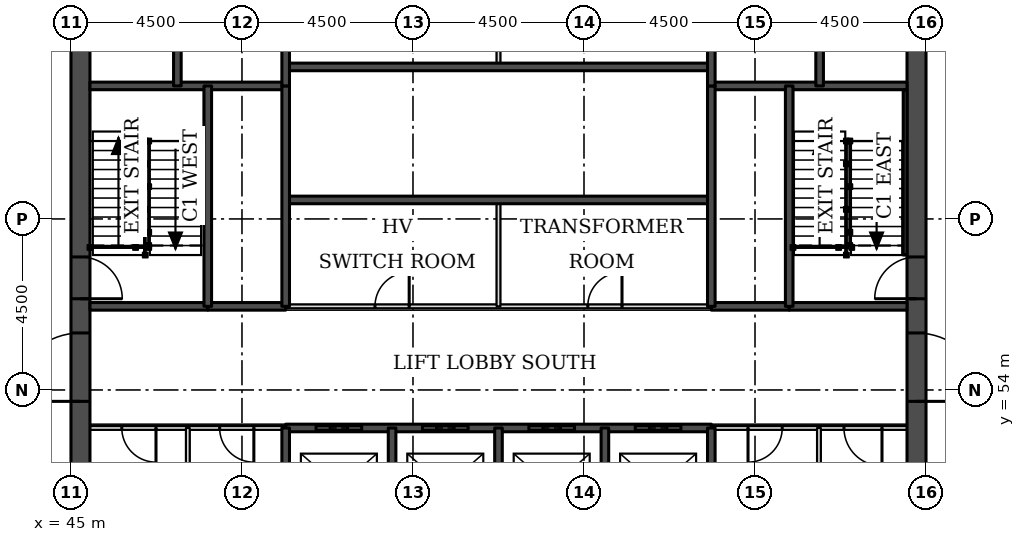
"""IFC4 building model, lengths in metres.
Left out: names, types, materials, properties, quantities, classifications, styles, units other than length and angle.
Written with IfcOpenShell. Run it as: python <this file> out.ifc"""

import sys

from ifc_helpers import new_model, si_unit, direction, frame, frame_2d, origin, place, context, subcontext, project, spatial, rectangle, extrude, element, fill, save


model = new_model("IFC4")
c1 = context("Model", 3, precision=1e-05, world=origin(), true_north=direction((0.0, 1.0)))
c2 = subcontext(c1, "Body", "Model", "MODEL_VIEW")
j1 = project(units=[si_unit("LENGTHUNIT", "METRE"), si_unit("PLANEANGLEUNIT", "RADIAN")], contexts=[c1])
p1 = place(None, origin())
s1 = spatial("IfcSite", under=j1, at=p1, CompositionType="ELEMENT")
p2 = place(p1, origin())
s2 = spatial("IfcBuilding", under=s1, at=p2, CompositionType="ELEMENT")
p3 = place(p2, frame((0.0, 0.0, -4.5)))
s3 = spatial("IfcBuildingStorey", under=s2, at=p3, CompositionType="ELEMENT", Elevation=-4.5)
p4 = place(p3, frame((45.25, 49.5, 0.0), z_axis=(0.0, 0.0, 1.0), x_axis=(0.0, 1.0, 0.0)))
e1 = element("IfcWall", 1, at=p4, inside=s3, PredefinedType="SHEAR", context=c2, shape_type="SweptSolid", body=[
    extrude(rectangle(XDim=22.5, YDim=0.5, at=frame_2d((11.25, 0.0))), origin(), (0.0, 0.0, 1.0), 4.5),
])
p5 = place(p4, frame((4.2, 0.0, 0.0)))
e2 = element("IfcOpeningElement", 2, at=p5, cuts=e1, PredefinedType="OPENING", context=c2, shape_type="SweptSolid", body=[
    extrude(rectangle(XDim=1.8, YDim=2.1, at=frame_2d((0.9, 1.05))), frame((0.0, 0.26, 0.0), z_axis=(0.0, -1.0, 0.0), x_axis=(1.0, 0.0, 0.0)), (0.0, 0.0, 1.0), 0.52),
])
p6 = place(p4, frame((6.9, 0.0, 0.0)))
e3 = element("IfcOpeningElement", 3, at=p6, cuts=e1, PredefinedType="OPENING", context=c2, shape_type="SweptSolid", body=[
    extrude(rectangle(XDim=1.1, YDim=2.1, at=frame_2d((0.55, 1.05))), frame((0.0, 0.26, 0.0), z_axis=(0.0, -1.0, 0.0), x_axis=(1.0, 0.0, 0.0)), (0.0, 0.0, 1.0), 0.52),
])
p7 = place(p4, frame((13.6, 0.0, 0.0)))
e4 = element("IfcOpeningElement", 4, at=p7, cuts=e1, PredefinedType="OPENING", context=c2, shape_type="SweptSolid", body=[
    extrude(rectangle(XDim=1.1, YDim=2.1, at=frame_2d((0.55, 1.05))), frame((0.0, 0.26, 0.0), z_axis=(0.0, -1.0, 0.0), x_axis=(1.0, 0.0, 0.0)), (0.0, 0.0, 1.0), 0.52),
])
p8 = place(p4, frame((16.5, 0.0, 0.0)))
e5 = element("IfcOpeningElement", 5, at=p8, cuts=e1, PredefinedType="OPENING", context=c2, shape_type="SweptSolid", body=[
    extrude(rectangle(XDim=1.8, YDim=2.1, at=frame_2d((0.9, 1.05))), frame((0.0, 0.26, 0.0), z_axis=(0.0, -1.0, 0.0), x_axis=(1.0, 0.0, 0.0)), (0.0, 0.0, 1.0), 0.52),
])
p9 = place(p3, frame((67.25, 49.5, 0.0), z_axis=(0.0, 0.0, 1.0), x_axis=(0.0, 1.0, 0.0)))
e6 = element("IfcWall", 6, at=p9, inside=s3, PredefinedType="SHEAR", context=c2, shape_type="SweptSolid", body=[
    extrude(rectangle(XDim=22.5, YDim=0.5, at=frame_2d((11.25, 0.0))), origin(), (0.0, 0.0, 1.0), 4.5),
])
p10 = place(p9, frame((4.2, 0.0, 0.0)))
e7 = element("IfcOpeningElement", 7, at=p10, cuts=e6, PredefinedType="OPENING", context=c2, shape_type="SweptSolid", body=[
    extrude(rectangle(XDim=1.8, YDim=2.1, at=frame_2d((0.9, 1.05))), frame((0.0, 0.26, 0.0), z_axis=(0.0, -1.0, 0.0), x_axis=(1.0, 0.0, 0.0)), (0.0, 0.0, 1.0), 0.52),
])
p11 = place(p9, frame((6.9, 0.0, 0.0)))
e8 = element("IfcOpeningElement", 8, at=p11, cuts=e6, PredefinedType="OPENING", context=c2, shape_type="SweptSolid", body=[
    extrude(rectangle(XDim=1.1, YDim=2.1, at=frame_2d((0.55, 1.05))), frame((0.0, 0.26, 0.0), z_axis=(0.0, -1.0, 0.0), x_axis=(1.0, 0.0, 0.0)), (0.0, 0.0, 1.0), 0.52),
])
p12 = place(p9, frame((13.6, 0.0, 0.0)))
e9 = element("IfcOpeningElement", 9, at=p12, cuts=e6, PredefinedType="OPENING", context=c2, shape_type="SweptSolid", body=[
    extrude(rectangle(XDim=1.1, YDim=2.1, at=frame_2d((0.55, 1.05))), frame((0.0, 0.26, 0.0), z_axis=(0.0, -1.0, 0.0), x_axis=(1.0, 0.0, 0.0)), (0.0, 0.0, 1.0), 0.52),
])
p13 = place(p9, frame((16.5, 0.0, 0.0)))
e10 = element("IfcOpeningElement", 10, at=p13, cuts=e6, PredefinedType="OPENING", context=c2, shape_type="SweptSolid", body=[
    extrude(rectangle(XDim=1.8, YDim=2.1, at=frame_2d((0.9, 1.05))), frame((0.0, 0.26, 0.0), z_axis=(0.0, -1.0, 0.0), x_axis=(1.0, 0.0, 0.0)), (0.0, 0.0, 1.0), 0.52),
])
p14 = place(p3, frame((45.5, 53.0, 0.0), z_axis=(0.0, 0.0, 1.0), x_axis=(1.0, 0.0, 0.0)))
e11 = element("IfcWall", 11, at=p14, inside=s3, PredefinedType="PARTITIONING", context=c2, shape_type="SweptSolid", body=[
    extrude(rectangle(XDim=5.15, YDim=0.1, at=frame_2d((2.575, 0.0))), origin(), (0.0, 0.0, 1.0), 4.1),
])
p15 = place(p14, frame((0.837, 0.0, 0.0)))
e12 = element("IfcOpeningElement", 12, at=p15, cuts=e11, PredefinedType="OPENING", context=c2, shape_type="SweptSolid", body=[
    extrude(rectangle(XDim=0.9, YDim=2.1, at=frame_2d((0.45, 1.05))), frame((0.0, 0.06, 0.0), z_axis=(0.0, -1.0, 0.0), x_axis=(1.0, 0.0, 0.0)), (0.0, 0.0, 1.0), 0.12),
])
p16 = place(p14, frame((3.413, 0.0, 0.0)))
e13 = element("IfcOpeningElement", 13, at=p16, cuts=e11, PredefinedType="OPENING", context=c2, shape_type="SweptSolid", body=[
    extrude(rectangle(XDim=0.9, YDim=2.1, at=frame_2d((0.45, 1.05))), frame((0.0, 0.06, 0.0), z_axis=(0.0, -1.0, 0.0), x_axis=(1.0, 0.0, 0.0)), (0.0, 0.0, 1.0), 0.12),
])
p17 = place(p3, frame((61.85, 53.0, 0.0), z_axis=(0.0, 0.0, 1.0), x_axis=(1.0, 0.0, 0.0)))
e14 = element("IfcWall", 14, at=p17, inside=s3, PredefinedType="PARTITIONING", context=c2, shape_type="SweptSolid", body=[
    extrude(rectangle(XDim=5.15, YDim=0.1, at=frame_2d((2.575, 0.0))), origin(), (0.0, 0.0, 1.0), 4.1),
])
p18 = place(p17, frame((3.491, 0.0, 0.0)))
e15 = element("IfcOpeningElement", 15, at=p18, cuts=e14, PredefinedType="OPENING", context=c2, shape_type="SweptSolid", body=[
    extrude(rectangle(XDim=1.0, YDim=2.1, at=frame_2d((0.5, 1.05))), frame((0.0, 0.06, 0.0), z_axis=(0.0, -1.0, 0.0), x_axis=(1.0, 0.0, 0.0)), (0.0, 0.0, 1.0), 0.12),
])
p19 = place(p17, frame((0.966, 0.0, 0.0)))
e16 = element("IfcOpeningElement", 16, at=p19, cuts=e14, PredefinedType="OPENING", context=c2, shape_type="SweptSolid", body=[
    extrude(rectangle(XDim=0.9, YDim=2.1, at=frame_2d((0.45, 1.05))), frame((0.0, 0.06, 0.0), z_axis=(0.0, -1.0, 0.0), x_axis=(1.0, 0.0, 0.0)), (0.0, 0.0, 1.0), 0.12),
])
p20 = place(p3, frame((50.65, 53.0, 0.0), z_axis=(0.0, 0.0, 1.0), x_axis=(1.0, 0.0, 0.0)))
e17 = element("IfcWall", 17, at=p20, inside=s3, PredefinedType="SOLIDWALL", context=c2, shape_type="SweptSolid", body=[
    extrude(rectangle(XDim=11.2, YDim=0.2, at=frame_2d((5.6, 0.0))), origin(), (0.0, 0.0, 1.0), 4.1),
])
p21 = place(p20, frame((0.8, 0.0, 0.0)))
e18 = element("IfcOpeningElement", 18, at=p21, cuts=e17, PredefinedType="OPENING", context=c2, shape_type="SweptSolid", body=[
    extrude(rectangle(XDim=1.2, YDim=2.1, at=frame_2d((0.6, 1.05))), frame((0.0, 0.11, 0.0), z_axis=(0.0, -1.0, 0.0), x_axis=(1.0, 0.0, 0.0)), (0.0, 0.0, 1.0), 0.22),
])
p22 = place(p20, frame((3.6, 0.0, 0.0)))
e19 = element("IfcOpeningElement", 19, at=p22, cuts=e17, PredefinedType="OPENING", context=c2, shape_type="SweptSolid", body=[
    extrude(rectangle(XDim=1.2, YDim=2.1, at=frame_2d((0.6, 1.05))), frame((0.0, 0.11, 0.0), z_axis=(0.0, -1.0, 0.0), x_axis=(1.0, 0.0, 0.0)), (0.0, 0.0, 1.0), 0.22),
])
p23 = place(p20, frame((6.4, 0.0, 0.0)))
e20 = element("IfcOpeningElement", 20, at=p23, cuts=e17, PredefinedType="OPENING", context=c2, shape_type="SweptSolid", body=[
    extrude(rectangle(XDim=1.2, YDim=2.1, at=frame_2d((0.6, 1.05))), frame((0.0, 0.11, 0.0), z_axis=(0.0, -1.0, 0.0), x_axis=(1.0, 0.0, 0.0)), (0.0, 0.0, 1.0), 0.22),
])
p24 = place(p20, frame((9.2, 0.0, 0.0)))
e21 = element("IfcOpeningElement", 21, at=p24, cuts=e17, PredefinedType="OPENING", context=c2, shape_type="SweptSolid", body=[
    extrude(rectangle(XDim=1.2, YDim=2.1, at=frame_2d((0.6, 1.05))), frame((0.0, 0.11, 0.0), z_axis=(0.0, -1.0, 0.0), x_axis=(1.0, 0.0, 0.0)), (0.0, 0.0, 1.0), 0.22),
])
p25 = place(p3, frame((50.65, 56.2, 0.0), z_axis=(0.0, 0.0, 1.0), x_axis=(1.0, 0.0, 0.0)))
e22 = element("IfcWall", 22, at=p25, inside=s3, PredefinedType="PARTITIONING", context=c2, shape_type="SweptSolid", body=[
    extrude(rectangle(XDim=11.2, YDim=0.1, at=frame_2d((5.6, 0.0))), origin(), (0.0, 0.0, 1.0), 4.1),
])
p26 = place(p25, frame((2.35, 0.0, 0.0)))
e23 = element("IfcOpeningElement", 23, at=p26, cuts=e22, PredefinedType="OPENING", context=c2, shape_type="SweptSolid", body=[
    extrude(rectangle(XDim=0.9, YDim=2.1, at=frame_2d((0.45, 1.05))), frame((0.0, 0.06, 0.0), z_axis=(0.0, -1.0, 0.0), x_axis=(1.0, 0.0, 0.0)), (0.0, 0.0, 1.0), 0.12),
])
p27 = place(p25, frame((7.95, 0.0, 0.0)))
e24 = element("IfcOpeningElement", 24, at=p27, cuts=e22, PredefinedType="OPENING", context=c2, shape_type="SweptSolid", body=[
    extrude(rectangle(XDim=0.9, YDim=2.1, at=frame_2d((0.45, 1.05))), frame((0.0, 0.06, 0.0), z_axis=(0.0, -1.0, 0.0), x_axis=(1.0, 0.0, 0.0)), (0.0, 0.0, 1.0), 0.12),
])
for number, where, z_axis, x_axis in (
    (25, (48.6, 56.2, 0.0), (0.0, 0.0, 1.0), (1.0, 0.0, 0.0)),
    (26, (61.85, 56.2, 0.0), (0.0, 0.0, 1.0), (1.0, 0.0, 0.0)),
):
    element("IfcWall", number, at=place(p3, frame(where, z_axis=z_axis, x_axis=x_axis)), inside=s3, PredefinedType="SOLIDWALL", context=c2, shape_type="SweptSolid", body=[
        extrude(rectangle(XDim=2.05, YDim=0.2, at=frame_2d((1.025, 0.0))), origin(), (0.0, 0.0, 1.0), 4.1),
    ])
for number, where, z_axis, x_axis in (
    (27, (45.5, 56.2, 0.0), (0.0, 0.0, 1.0), (1.0, 0.0, 0.0)),
    (28, (63.9, 56.2, 0.0), (0.0, 0.0, 1.0), (1.0, 0.0, 0.0)),
):
    element("IfcWall", number, at=place(p3, frame(where, z_axis=z_axis, x_axis=x_axis)), inside=s3, PredefinedType="SOLIDWALL", context=c2, shape_type="SweptSolid", body=[
        extrude(rectangle(XDim=3.1, YDim=0.2, at=frame_2d((1.55, 0.0))), origin(), (0.0, 0.0, 1.0), 4.1),
    ])
p28 = place(p3, frame((50.65, 59.0, 0.0), z_axis=(0.0, 0.0, 1.0), x_axis=(1.0, 0.0, 0.0)))
e29 = element("IfcWall", 29, at=p28, inside=s3, PredefinedType="SOLIDWALL", context=c2, shape_type="SweptSolid", body=[
    extrude(rectangle(XDim=11.2, YDim=0.2, at=frame_2d((5.6, 0.0))), origin(), (0.0, 0.0, 1.0), 4.5),
])
for number, where, z_axis, x_axis in (
    (30, (45.5, 62.0, 0.0), (0.0, 0.0, 1.0), (1.0, 0.0, 0.0)),
    (31, (61.85, 62.0, 0.0), (0.0, 0.0, 1.0), (1.0, 0.0, 0.0)),
):
    element("IfcWall", number, at=place(p3, frame(where, z_axis=z_axis, x_axis=x_axis)), inside=s3, PredefinedType="SOLIDWALL", context=c2, shape_type="SweptSolid", body=[
        extrude(rectangle(XDim=5.15, YDim=0.2, at=frame_2d((2.575, 0.0))), origin(), (0.0, 0.0, 1.0), 4.1),
    ])
p29 = place(p3, frame((50.65, 62.5, 0.0), z_axis=(0.0, 0.0, 1.0), x_axis=(1.0, 0.0, 0.0)))
e32 = element("IfcWall", 32, at=p29, inside=s3, PredefinedType="SOLIDWALL", context=c2, shape_type="SweptSolid", body=[
    extrude(rectangle(XDim=11.2, YDim=0.2, at=frame_2d((5.6, 0.0))), origin(), (0.0, 0.0, 1.0), 4.5),
])
p30 = place(p3, frame((47.8, 62.0, 0.0), z_axis=(0.0, 0.0, 1.0), x_axis=(0.0, 1.0, 0.0)))
e33 = element("IfcWall", 33, at=p30, inside=s3, PredefinedType="SOLIDWALL", context=c2, shape_type="SweptSolid", body=[
    extrude(rectangle(XDim=3.3, YDim=0.2, at=frame_2d((1.65, 0.0))), origin(), (0.0, 0.0, 1.0), 4.1),
])
p31 = place(p30, frame((1.1, 0.0, 0.0)))
e34 = element("IfcOpeningElement", 34, at=p31, cuts=e33, PredefinedType="OPENING", context=c2, shape_type="SweptSolid", body=[
    extrude(rectangle(XDim=1.1, YDim=2.1, at=frame_2d((0.55, 1.05))), frame((0.0, 0.11, 0.0), z_axis=(0.0, -1.0, 0.0), x_axis=(1.0, 0.0, 0.0)), (0.0, 0.0, 1.0), 0.22),
])
p32 = place(p3, frame((48.075, 50.0, 0.0), z_axis=(0.0, 0.0, 1.0), x_axis=(0.0, 1.0, 0.0)))
e35 = element("IfcWall", 35, at=p32, inside=s3, PredefinedType="PARTITIONING", context=c2, shape_type="SweptSolid", body=[
    extrude(rectangle(XDim=3.0, YDim=0.1, at=frame_2d((1.5, 0.0))), origin(), (0.0, 0.0, 1.0), 4.1),
])
p33 = place(p3, frame((48.6, 56.2, 0.0), z_axis=(0.0, 0.0, 1.0), x_axis=(0.0, 1.0, 0.0)))
e36 = element("IfcWall", 36, at=p33, inside=s3, PredefinedType="SOLIDWALL", context=c2, shape_type="SweptSolid", body=[
    extrude(rectangle(XDim=5.8, YDim=0.2, at=frame_2d((2.9, 0.0))), origin(), (0.0, 0.0, 1.0), 4.1),
])
p34 = place(p3, frame((50.65, 56.2, 0.0), z_axis=(0.0, 0.0, 1.0), x_axis=(0.0, 1.0, 0.0)))
e37 = element("IfcWall", 37, at=p34, inside=s3, PredefinedType="SOLIDWALL", context=c2, shape_type="SweptSolid", body=[
    extrude(rectangle(XDim=5.8, YDim=0.2, at=frame_2d((2.9, 0.0))), origin(), (0.0, 0.0, 1.0), 4.5),
])
p35 = place(p3, frame((50.65, 50.0, 0.0), z_axis=(0.0, 0.0, 1.0), x_axis=(0.0, 1.0, 0.0)))
e38 = element("IfcWall", 38, at=p35, inside=s3, PredefinedType="SOLIDWALL", context=c2, shape_type="SweptSolid", body=[
    extrude(rectangle(XDim=3.0, YDim=0.2, at=frame_2d((1.5, 0.0))), origin(), (0.0, 0.0, 1.0), 4.1),
])
p36 = place(p3, frame((50.65, 62.0, 0.0), z_axis=(0.0, 0.0, 1.0), x_axis=(0.0, 1.0, 0.0)))
e39 = element("IfcWall", 39, at=p36, inside=s3, PredefinedType="SOLIDWALL", context=c2, shape_type="SweptSolid", body=[
    extrude(rectangle(XDim=3.3, YDim=0.2, at=frame_2d((1.65, 0.0))), origin(), (0.0, 0.0, 1.0), 4.1),
])
p37 = place(p3, frame((53.45, 50.0, 0.0), z_axis=(0.0, 0.0, 1.0), x_axis=(0.0, 1.0, 0.0)))
e40 = element("IfcWall", 40, at=p37, inside=s3, PredefinedType="SOLIDWALL", context=c2, shape_type="SweptSolid", body=[
    extrude(rectangle(XDim=3.0, YDim=0.2, at=frame_2d((1.5, 0.0))), origin(), (0.0, 0.0, 1.0), 4.1),
])
for number, where, z_axis, x_axis in (
    (41, (56.25, 56.2, 0.0), (0.0, 0.0, 1.0), (0.0, 1.0, 0.0)),
    (42, (56.25, 62.5, 0.0), (0.0, 0.0, 1.0), (0.0, 1.0, 0.0)),
):
    element("IfcWall", number, at=place(p3, frame(where, z_axis=z_axis, x_axis=x_axis)), inside=s3, PredefinedType="PARTITIONING", context=c2, shape_type="SweptSolid", body=[
        extrude(rectangle(XDim=2.8, YDim=0.1, at=frame_2d((1.4, 0.0))), origin(), (0.0, 0.0, 1.0), 4.1),
    ])
for number, where, z_axis, x_axis in (
    (43, (56.25, 50.0, 0.0), (0.0, 0.0, 1.0), (0.0, 1.0, 0.0)),
    (44, (59.05, 50.0, 0.0), (0.0, 0.0, 1.0), (0.0, 1.0, 0.0)),
):
    element("IfcWall", number, at=place(p3, frame(where, z_axis=z_axis, x_axis=x_axis)), inside=s3, PredefinedType="SOLIDWALL", context=c2, shape_type="SweptSolid", body=[
        extrude(rectangle(XDim=3.0, YDim=0.2, at=frame_2d((1.5, 0.0))), origin(), (0.0, 0.0, 1.0), 4.1),
    ])
p38 = place(p3, frame((61.85, 56.2, 0.0), z_axis=(0.0, 0.0, 1.0), x_axis=(0.0, 1.0, 0.0)))
e45 = element("IfcWall", 45, at=p38, inside=s3, PredefinedType="SOLIDWALL", context=c2, shape_type="SweptSolid", body=[
    extrude(rectangle(XDim=5.8, YDim=0.2, at=frame_2d((2.9, 0.0))), origin(), (0.0, 0.0, 1.0), 4.5),
])
p39 = place(p3, frame((61.85, 50.0, 0.0), z_axis=(0.0, 0.0, 1.0), x_axis=(0.0, 1.0, 0.0)))
e46 = element("IfcWall", 46, at=p39, inside=s3, PredefinedType="SOLIDWALL", context=c2, shape_type="SweptSolid", body=[
    extrude(rectangle(XDim=3.0, YDim=0.2, at=frame_2d((1.5, 0.0))), origin(), (0.0, 0.0, 1.0), 4.1),
])
p40 = place(p3, frame((61.85, 62.0, 0.0), z_axis=(0.0, 0.0, 1.0), x_axis=(0.0, 1.0, 0.0)))
e47 = element("IfcWall", 47, at=p40, inside=s3, PredefinedType="SOLIDWALL", context=c2, shape_type="SweptSolid", body=[
    extrude(rectangle(XDim=3.3, YDim=0.2, at=frame_2d((1.65, 0.0))), origin(), (0.0, 0.0, 1.0), 4.1),
])
p41 = place(p3, frame((63.9, 56.2, 0.0), z_axis=(0.0, 0.0, 1.0), x_axis=(0.0, 1.0, 0.0)))
e48 = element("IfcWall", 48, at=p41, inside=s3, PredefinedType="SOLIDWALL", context=c2, shape_type="SweptSolid", body=[
    extrude(rectangle(XDim=5.8, YDim=0.2, at=frame_2d((2.9, 0.0))), origin(), (0.0, 0.0, 1.0), 4.1),
])
p42 = place(p3, frame((64.683, 50.0, 0.0), z_axis=(0.0, 0.0, 1.0), x_axis=(0.0, 1.0, 0.0)))
e49 = element("IfcWall", 49, at=p42, inside=s3, PredefinedType="PARTITIONING", context=c2, shape_type="SweptSolid", body=[
    extrude(rectangle(XDim=3.0, YDim=0.1, at=frame_2d((1.5, 0.0))), origin(), (0.0, 0.0, 1.0), 4.1),
])
p43 = place(p3, frame((64.7, 62.0, 0.0), z_axis=(0.0, 0.0, 1.0), x_axis=(0.0, 1.0, 0.0)))
e50 = element("IfcWall", 50, at=p43, inside=s3, PredefinedType="SOLIDWALL", context=c2, shape_type="SweptSolid", body=[
    extrude(rectangle(XDim=3.3, YDim=0.2, at=frame_2d((1.65, 0.0))), origin(), (0.0, 0.0, 1.0), 4.1),
])
p44 = place(p43, frame((1.1, 0.0, 0.0)))
e51 = element("IfcOpeningElement", 51, at=p44, cuts=e50, PredefinedType="OPENING", context=c2, shape_type="SweptSolid", body=[
    extrude(rectangle(XDim=1.1, YDim=2.1, at=frame_2d((0.55, 1.05))), frame((0.0, 0.11, 0.0), z_axis=(0.0, -1.0, 0.0), x_axis=(1.0, 0.0, 0.0)), (0.0, 0.0, 1.0), 0.22),
])
p45 = place(p3, frame((66.95, 57.55, 0.0), z_axis=(0.0, 0.0, 1.0), x_axis=(0.0, 1.0, 0.0)))
e52 = element("IfcWall", 52, at=p45, inside=s3, PredefinedType="SOLIDWALL", context=c2, shape_type="SweptSolid", body=[
    extrude(rectangle(XDim=4.35, YDim=0.1, at=frame_2d((2.175, 0.0))), origin(), (0.0, 0.0, 1.0), 4.1),
])
p46 = place(p21, origin())
e53 = element("IfcDoor", 53, at=p46, inside=s3, OperationType="DOUBLE_DOOR_SLIDING", PredefinedType="DOOR", context=c2, shape_type="SweptSolid", body=[
    extrude(rectangle(XDim=1.2, YDim=2.1, at=frame_2d((0.6, 1.05))), frame((0.0, 0.025, 0.0), z_axis=(0.0, -1.0, 0.0), x_axis=(1.0, 0.0, 0.0)), (0.0, 0.0, 1.0), 0.05),
])
fill(e18, e53)
p47 = place(p22, origin())
e54 = element("IfcDoor", 54, at=p47, inside=s3, OperationType="DOUBLE_DOOR_SLIDING", PredefinedType="DOOR", context=c2, shape_type="SweptSolid", body=[
    extrude(rectangle(XDim=1.2, YDim=2.1, at=frame_2d((0.6, 1.05))), frame((0.0, 0.025, 0.0), z_axis=(0.0, -1.0, 0.0), x_axis=(1.0, 0.0, 0.0)), (0.0, 0.0, 1.0), 0.05),
])
fill(e19, e54)
p48 = place(p23, origin())
e55 = element("IfcDoor", 55, at=p48, inside=s3, OperationType="DOUBLE_DOOR_SLIDING", PredefinedType="DOOR", context=c2, shape_type="SweptSolid", body=[
    extrude(rectangle(XDim=1.2, YDim=2.1, at=frame_2d((0.6, 1.05))), frame((0.0, 0.025, 0.0), z_axis=(0.0, -1.0, 0.0), x_axis=(1.0, 0.0, 0.0)), (0.0, 0.0, 1.0), 0.05),
])
fill(e20, e55)
p49 = place(p24, origin())
e56 = element("IfcDoor", 56, at=p49, inside=s3, OperationType="DOUBLE_DOOR_SLIDING", PredefinedType="DOOR", context=c2, shape_type="SweptSolid", body=[
    extrude(rectangle(XDim=1.2, YDim=2.1, at=frame_2d((0.6, 1.05))), frame((0.0, 0.025, 0.0), z_axis=(0.0, -1.0, 0.0), x_axis=(1.0, 0.0, 0.0)), (0.0, 0.0, 1.0), 0.05),
])
fill(e21, e56)
p50 = place(p5, origin())
e57 = element("IfcDoor", 57, at=p50, inside=s3, OperationType="SINGLE_SWING_LEFT", PredefinedType="DOOR", context=c2, shape_type="SweptSolid", body=[
    extrude(rectangle(XDim=1.8, YDim=2.1, at=frame_2d((0.9, 1.05))), frame((0.0, 0.025, 0.0), z_axis=(0.0, -1.0, 0.0), x_axis=(1.0, 0.0, 0.0)), (0.0, 0.0, 1.0), 0.05),
])
fill(e2, e57)
p51 = place(p6, frame((1.1, 0.0, 0.0), z_axis=(0.0, 0.0, 1.0), x_axis=(-1.0, 0.0, 0.0)))
e58 = element("IfcDoor", 58, at=p51, inside=s3, OperationType="SINGLE_SWING_RIGHT", PredefinedType="DOOR", context=c2, shape_type="SweptSolid", body=[
    extrude(rectangle(XDim=1.1, YDim=2.1, at=frame_2d((0.55, 1.05))), frame((0.0, 0.025, 0.0), z_axis=(0.0, -1.0, 0.0), x_axis=(1.0, 0.0, 0.0)), (0.0, 0.0, 1.0), 0.05),
])
fill(e3, e58)
p52 = place(p10, frame((1.8, 0.0, 0.0), z_axis=(0.0, 0.0, 1.0), x_axis=(-1.0, 0.0, 0.0)))
e59 = element("IfcDoor", 59, at=p52, inside=s3, OperationType="SINGLE_SWING_RIGHT", PredefinedType="DOOR", context=c2, shape_type="SweptSolid", body=[
    extrude(rectangle(XDim=1.8, YDim=2.1, at=frame_2d((0.9, 1.05))), frame((0.0, 0.025, 0.0), z_axis=(0.0, -1.0, 0.0), x_axis=(1.0, 0.0, 0.0)), (0.0, 0.0, 1.0), 0.05),
])
fill(e7, e59)
p53 = place(p11, origin())
e60 = element("IfcDoor", 60, at=p53, inside=s3, OperationType="SINGLE_SWING_LEFT", PredefinedType="DOOR", context=c2, shape_type="SweptSolid", body=[
    extrude(rectangle(XDim=1.1, YDim=2.1, at=frame_2d((0.55, 1.05))), frame((0.0, 0.025, 0.0), z_axis=(0.0, -1.0, 0.0), x_axis=(1.0, 0.0, 0.0)), (0.0, 0.0, 1.0), 0.05),
])
fill(e8, e60)
p54 = place(p18, frame((1.0, 0.0, 0.0), z_axis=(0.0, 0.0, 1.0), x_axis=(-1.0, 0.0, 0.0)))
e61 = element("IfcDoor", 61, at=p54, inside=s3, OperationType="SINGLE_SWING_LEFT", PredefinedType="DOOR", context=c2, shape_type="SweptSolid", body=[
    extrude(rectangle(XDim=1.0, YDim=2.1, at=frame_2d((0.5, 1.05))), frame((0.0, 0.025, 0.0), z_axis=(0.0, -1.0, 0.0), x_axis=(1.0, 0.0, 0.0)), (0.0, 0.0, 1.0), 0.05),
])
fill(e15, e61)
p55 = place(p19, frame((0.9, 0.0, 0.0), z_axis=(0.0, 0.0, 1.0), x_axis=(-1.0, 0.0, 0.0)))
e62 = element("IfcDoor", 62, at=p55, inside=s3, OperationType="SINGLE_SWING_RIGHT", PredefinedType="DOOR", context=c2, shape_type="SweptSolid", body=[
    extrude(rectangle(XDim=0.9, YDim=2.1, at=frame_2d((0.45, 1.05))), frame((0.0, 0.025, 0.0), z_axis=(0.0, -1.0, 0.0), x_axis=(1.0, 0.0, 0.0)), (0.0, 0.0, 1.0), 0.05),
])
fill(e16, e62)
p56 = place(p15, frame((0.9, 0.0, 0.0), z_axis=(0.0, 0.0, 1.0), x_axis=(-1.0, 0.0, 0.0)))
e63 = element("IfcDoor", 63, at=p56, inside=s3, OperationType="SINGLE_SWING_LEFT", PredefinedType="DOOR", context=c2, shape_type="SweptSolid", body=[
    extrude(rectangle(XDim=0.9, YDim=2.1, at=frame_2d((0.45, 1.05))), frame((0.0, 0.025, 0.0), z_axis=(0.0, -1.0, 0.0), x_axis=(1.0, 0.0, 0.0)), (0.0, 0.0, 1.0), 0.05),
])
fill(e12, e63)
p57 = place(p16, frame((0.9, 0.0, 0.0), z_axis=(0.0, 0.0, 1.0), x_axis=(-1.0, 0.0, 0.0)))
e64 = element("IfcDoor", 64, at=p57, inside=s3, OperationType="SINGLE_SWING_LEFT", PredefinedType="DOOR", context=c2, shape_type="SweptSolid", body=[
    extrude(rectangle(XDim=0.9, YDim=2.1, at=frame_2d((0.45, 1.05))), frame((0.0, 0.025, 0.0), z_axis=(0.0, -1.0, 0.0), x_axis=(1.0, 0.0, 0.0)), (0.0, 0.0, 1.0), 0.05),
])
fill(e13, e64)
p58 = place(p26, origin())
e65 = element("IfcDoor", 65, at=p58, inside=s3, OperationType="SINGLE_SWING_RIGHT", PredefinedType="DOOR", context=c2, shape_type="SweptSolid", body=[
    extrude(rectangle(XDim=0.9, YDim=2.1, at=frame_2d((0.45, 1.05))), frame((0.0, 0.025, 0.0), z_axis=(0.0, -1.0, 0.0), x_axis=(1.0, 0.0, 0.0)), (0.0, 0.0, 1.0), 0.05),
])
fill(e23, e65)
p59 = place(p27, origin())
e66 = element("IfcDoor", 66, at=p59, inside=s3, OperationType="SINGLE_SWING_RIGHT", PredefinedType="DOOR", context=c2, shape_type="SweptSolid", body=[
    extrude(rectangle(XDim=0.9, YDim=2.1, at=frame_2d((0.45, 1.05))), frame((0.0, 0.025, 0.0), z_axis=(0.0, -1.0, 0.0), x_axis=(1.0, 0.0, 0.0)), (0.0, 0.0, 1.0), 0.05),
])
fill(e24, e66)
save(model, sys.argv[1])
